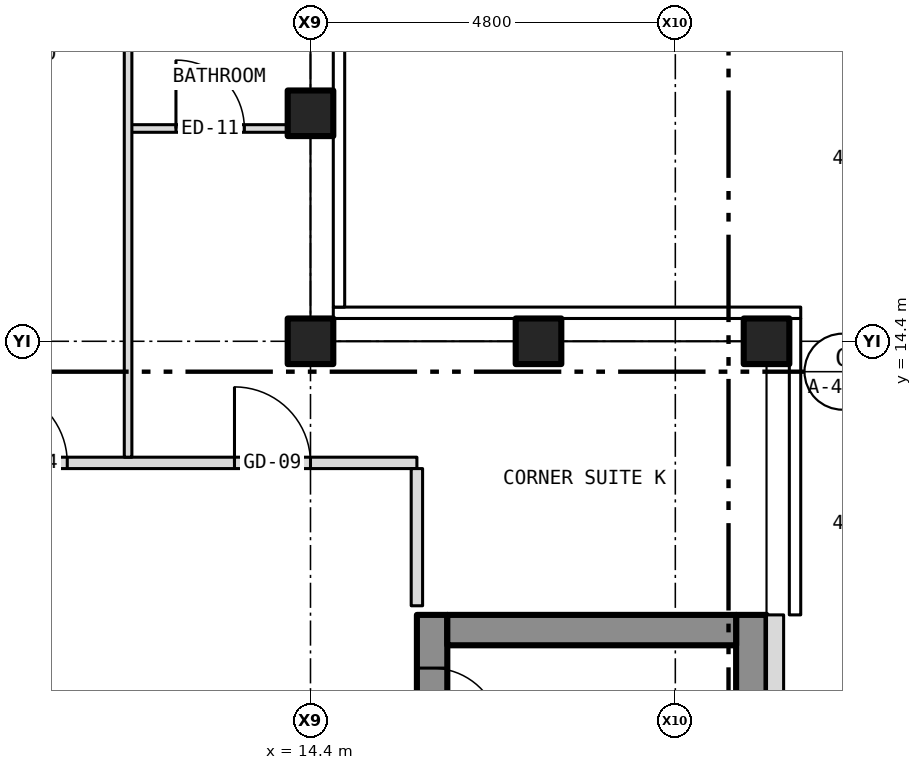
"""IFC4 building model, lengths in metres.
Left out: names, types, materials, properties, quantities, classifications, styles, units other than length and angle.
Written with IfcOpenShell. Run it as: python <this file> out.ifc"""

import sys

from ifc_helpers import new_model, si_unit, direction, frame, frame_2d, origin, origin_2d, place, context, subcontext, project, spatial, rectangle, hollow_rectangle, extrude, element, fill, save


model = new_model("IFC4")
c1 = context("Model", 3, precision=1e-05, world=origin(), true_north=direction((0.0, 1.0)))
c2 = subcontext(c1, "Body", "Model", "MODEL_VIEW")
j1 = project(units=[si_unit("LENGTHUNIT", "METRE"), si_unit("PLANEANGLEUNIT", "RADIAN")], contexts=[c1])
p1 = place(None, origin())
s1 = spatial("IfcSite", under=j1, at=p1, CompositionType="ELEMENT")
p2 = place(p1, origin())
s2 = spatial("IfcBuilding", under=s1, at=p2, CompositionType="ELEMENT")
p3 = place(p2, frame((0.0, 0.0, 262.0)))
s3 = spatial("IfcBuildingStorey", under=s2, at=p3, CompositionType="ELEMENT", Elevation=262.0)
for number, where, z_axis, x_axis in (
    (1, (20.4, 14.4, -0.15), (0.0, 0.0, 1.0), (1.0, 0.0, 0.0)),
    (2, (14.4, 14.4, -0.15), (0.0, 0.0, 1.0), (1.0, 0.0, 0.0)),
    (3, (14.4, 17.4, -0.15), (0.0, 0.0, 1.0), (1.0, 0.0, 0.0)),
    (4, (17.4, 14.4, -0.15), (0.0, 0.0, 1.0), (1.0, 0.0, 0.0)),
):
    element("IfcColumn", number, at=place(p3, frame(where, z_axis=z_axis, x_axis=x_axis)), inside=s3, PredefinedType="COLUMN", context=c2, shape_type="SweptSolid", body=[
        extrude(hollow_rectangle(XDim=0.6, YDim=0.6, WallThickness=0.03, at=origin_2d()), origin(), (0.0, 0.0, 1.0), 3.4),
    ])
p4 = place(p3, frame((16.0, -10.8, 0.0), z_axis=(0.0, 0.0, 1.0), x_axis=(0.0, 1.0, 0.0)))
e5 = element("IfcWall", 5, at=p4, inside=s3, PredefinedType="SHEAR", context=c2, shape_type="SweptSolid", body=[
    extrude(rectangle(XDim=21.6, YDim=0.4, at=frame_2d((10.8, 0.0))), origin(), (0.0, 0.0, 1.0), 3.25),
])
p5 = place(p4, frame((9.4, 0.0, 0.0)))
e6 = element("IfcOpeningElement", 6, at=p5, cuts=e5, PredefinedType="OPENING", context=c2, shape_type="SweptSolid", body=[
    extrude(rectangle(XDim=1.1, YDim=2.1, at=frame_2d((0.55, 1.05))), frame((0.0, 0.212, 0.0), z_axis=(0.0, -1.0, 0.0), x_axis=(1.0, 0.0, 0.0)), (0.0, 0.0, 1.0), 0.424),
])
p6 = place(p4, frame((11.5, 0.0, 0.0)))
e7 = element("IfcOpeningElement", 7, at=p6, cuts=e5, PredefinedType="OPENING", context=c2, shape_type="SweptSolid", body=[
    extrude(rectangle(XDim=1.1, YDim=2.1, at=frame_2d((0.55, 1.05))), frame((0.0, 0.212, 0.0), z_axis=(0.0, -1.0, 0.0), x_axis=(1.0, 0.0, 0.0)), (0.0, 0.0, 1.0), 0.424),
])
p7 = place(p4, frame((13.6, 0.0, 0.0)))
e8 = element("IfcOpeningElement", 8, at=p7, cuts=e5, PredefinedType="OPENING", context=c2, shape_type="SweptSolid", body=[
    extrude(rectangle(XDim=1.1, YDim=2.1, at=frame_2d((0.55, 1.05))), frame((0.0, 0.212, 0.0), z_axis=(0.0, -1.0, 0.0), x_axis=(1.0, 0.0, 0.0)), (0.0, 0.0, 1.0), 0.424),
])
p8 = place(p4, frame((15.7, 0.0, 0.0)))
e9 = element("IfcOpeningElement", 9, at=p8, cuts=e5, PredefinedType="OPENING", context=c2, shape_type="SweptSolid", body=[
    extrude(rectangle(XDim=1.1, YDim=2.1, at=frame_2d((0.55, 1.05))), frame((0.0, 0.212, 0.0), z_axis=(0.0, -1.0, 0.0), x_axis=(1.0, 0.0, 0.0)), (0.0, 0.0, 1.0), 0.424),
])
p9 = place(p4, frame((17.8, 0.0, 0.0)))
e10 = element("IfcOpeningElement", 10, at=p9, cuts=e5, PredefinedType="OPENING", context=c2, shape_type="SweptSolid", body=[
    extrude(rectangle(XDim=1.1, YDim=2.1, at=frame_2d((0.55, 1.05))), frame((0.0, 0.212, 0.0), z_axis=(0.0, -1.0, 0.0), x_axis=(1.0, 0.0, 0.0)), (0.0, 0.0, 1.0), 0.424),
])
p10 = place(p4, frame((5.642, 0.0, 0.0)))
e11 = element("IfcOpeningElement", 11, at=p10, cuts=e5, PredefinedType="OPENING", context=c2, shape_type="SweptSolid", body=[
    extrude(rectangle(XDim=1.1, YDim=2.1, at=frame_2d((0.55, 1.05))), frame((0.0, 0.212, 0.0), z_axis=(0.0, -1.0, 0.0), x_axis=(1.0, 0.0, 0.0)), (0.0, 0.0, 1.0), 0.424),
])
p11 = place(p4, frame((7.5, 0.0, 0.0)))
e12 = element("IfcOpeningElement", 12, at=p11, cuts=e5, PredefinedType="OPENING", context=c2, shape_type="SweptSolid", body=[
    extrude(rectangle(XDim=1.1, YDim=2.1, at=frame_2d((0.55, 1.05))), frame((0.0, 0.212, 0.0), z_axis=(0.0, -1.0, 0.0), x_axis=(1.0, 0.0, 0.0)), (0.0, 0.0, 1.0), 0.424),
])
p12 = place(p4, frame((20.0, 0.0, 0.0)))
e13 = element("IfcOpeningElement", 13, at=p12, cuts=e5, PredefinedType="OPENING", context=c2, shape_type="SweptSolid", body=[
    extrude(rectangle(XDim=0.9, YDim=2.1, at=frame_2d((0.45, 1.05))), frame((0.0, 0.212, 0.0), z_axis=(0.0, -1.0, 0.0), x_axis=(1.0, 0.0, 0.0)), (0.0, 0.0, 1.0), 0.424),
])
p13 = place(p3, frame((20.2, -10.8, 0.0), z_axis=(0.0, 0.0, 1.0), x_axis=(0.0, 1.0, 0.0)))
e14 = element("IfcWall", 14, at=p13, inside=s3, PredefinedType="SHEAR", context=c2, shape_type="SweptSolid", body=[
    extrude(rectangle(XDim=21.6, YDim=0.4, at=frame_2d((10.8, 0.0))), origin(), (0.0, 0.0, 1.0), 3.25),
])
p14 = place(p3, frame((16.2, 10.6, 0.0), z_axis=(0.0, 0.0, 1.0), x_axis=(1.0, 0.0, 0.0)))
e15 = element("IfcWall", 15, at=p14, inside=s3, PredefinedType="SHEAR", context=c2, shape_type="SweptSolid", body=[
    extrude(rectangle(XDim=3.8, YDim=0.4, at=frame_2d((1.9, 0.0))), origin(), (0.0, 0.0, 1.0), 3.25),
])
p15 = place(p3, frame((20.512, -10.8, 0.0), z_axis=(0.0, 0.0, 1.0), x_axis=(0.0, 1.0, 0.0)))
e16 = element("IfcWall", 16, at=p15, inside=s3, PredefinedType="SOLIDWALL", context=c2, shape_type="SweptSolid", body=[
    extrude(rectangle(XDim=21.6, YDim=0.225, at=frame_2d((10.8, 0.0))), origin(), (0.0, 0.0, 1.0), 3.5),
])
p16 = place(p15, frame((2.95, 0.0, 1.0)))
e17 = element("IfcOpeningElement", 17, at=p16, cuts=e16, PredefinedType="OPENING", context=c2, shape_type="SweptSolid", body=[
    extrude(rectangle(XDim=0.6, YDim=1.5, at=frame_2d((0.3, 0.75))), frame((0.0, 0.125, 0.0), z_axis=(0.0, -1.0, 0.0), x_axis=(1.0, 0.0, 0.0)), (0.0, 0.0, 1.0), 0.249),
])
p17 = place(p3, frame((-15.8, 12.8, 0.0), z_axis=(0.0, 0.0, 1.0), x_axis=(1.0, 0.0, 0.0)))
e18 = element("IfcWall", 18, at=p17, inside=s3, PredefinedType="PARTITIONING", context=c2, shape_type="SweptSolid", body=[
    extrude(rectangle(XDim=31.6, YDim=0.15, at=frame_2d((15.8, 0.0))), origin(), (0.0, 0.0, 1.0), 3.25),
])
p18 = place(p17, frame((4.6, 0.0, 0.0)))
e19 = element("IfcOpeningElement", 19, at=p18, cuts=e18, PredefinedType="OPENING", context=c2, shape_type="SweptSolid", body=[
    extrude(rectangle(XDim=1.0, YDim=2.1, at=frame_2d((0.5, 1.05))), frame((0.0, 0.087, 0.0), z_axis=(0.0, -1.0, 0.0), x_axis=(1.0, 0.0, 0.0)), (0.0, 0.0, 1.0), 0.174),
])
p19 = place(p17, frame((10.6, 0.0, 0.0)))
e20 = element("IfcOpeningElement", 20, at=p19, cuts=e18, PredefinedType="OPENING", context=c2, shape_type="SweptSolid", body=[
    extrude(rectangle(XDim=1.0, YDim=2.1, at=frame_2d((0.5, 1.05))), frame((0.0, 0.087, 0.0), z_axis=(0.0, -1.0, 0.0), x_axis=(1.0, 0.0, 0.0)), (0.0, 0.0, 1.0), 0.174),
])
p20 = place(p17, frame((17.8, 0.0, 0.0)))
e21 = element("IfcOpeningElement", 21, at=p20, cuts=e18, PredefinedType="OPENING", context=c2, shape_type="SweptSolid", body=[
    extrude(rectangle(XDim=1.0, YDim=2.1, at=frame_2d((0.5, 1.05))), frame((0.0, 0.087, 0.0), z_axis=(0.0, -1.0, 0.0), x_axis=(1.0, 0.0, 0.0)), (0.0, 0.0, 1.0), 0.174),
])
p21 = place(p17, frame((26.0, 0.0, 0.0)))
e22 = element("IfcOpeningElement", 22, at=p21, cuts=e18, PredefinedType="OPENING", context=c2, shape_type="SweptSolid", body=[
    extrude(rectangle(XDim=1.0, YDim=2.1, at=frame_2d((0.5, 1.05))), frame((0.0, 0.087, 0.0), z_axis=(0.0, -1.0, 0.0), x_axis=(1.0, 0.0, 0.0)), (0.0, 0.0, 1.0), 0.174),
])
p22 = place(p17, frame((1.4, 0.0, 0.0)))
e23 = element("IfcOpeningElement", 23, at=p22, cuts=e18, PredefinedType="OPENING", context=c2, shape_type="SweptSolid", body=[
    extrude(rectangle(XDim=1.0, YDim=2.1, at=frame_2d((0.5, 1.05))), frame((0.0, 0.087, 0.0), z_axis=(0.0, -1.0, 0.0), x_axis=(1.0, 0.0, 0.0)), (0.0, 0.0, 1.0), 0.174),
])
p23 = place(p17, frame((29.2, 0.0, 0.0)))
e24 = element("IfcOpeningElement", 24, at=p23, cuts=e18, PredefinedType="OPENING", context=c2, shape_type="SweptSolid", body=[
    extrude(rectangle(XDim=1.0, YDim=2.1, at=frame_2d((0.5, 1.05))), frame((0.0, 0.087, 0.0), z_axis=(0.0, -1.0, 0.0), x_axis=(1.0, 0.0, 0.0)), (0.0, 0.0, 1.0), 0.174),
])
p24 = place(p3, frame((12.0, 17.2, 0.0), z_axis=(0.0, 0.0, 1.0), x_axis=(1.0, 0.0, 0.0)))
e25 = element("IfcWall", 25, at=p24, inside=s3, PredefinedType="PARTITIONING", context=c2, shape_type="SweptSolid", body=[
    extrude(rectangle(XDim=2.28, YDim=0.1, at=frame_2d((1.14, 0.0))), origin(), (0.0, 0.0, 1.0), 3.25),
])
p25 = place(p24, frame((0.63, 0.0, 0.0)))
e26 = element("IfcOpeningElement", 26, at=p25, cuts=e25, PredefinedType="OPENING", context=c2, shape_type="SweptSolid", body=[
    extrude(rectangle(XDim=0.9, YDim=2.1, at=frame_2d((0.45, 1.05))), frame((0.0, 0.062, 0.0), z_axis=(0.0, -1.0, 0.0), x_axis=(1.0, 0.0, 0.0)), (0.0, 0.0, 1.0), 0.124),
])
p26 = place(p3, frame((12.0, 12.875, 0.0), z_axis=(0.0, 0.0, 1.0), x_axis=(0.0, 1.0, 0.0)))
e27 = element("IfcWall", 27, at=p26, inside=s3, PredefinedType="PARTITIONING", context=c2, shape_type="SweptSolid", body=[
    extrude(rectangle(XDim=7.855, YDim=0.1, at=frame_2d((3.927, 0.0))), origin(), (0.0, 0.0, 1.0), 3.25),
])
p27 = place(p3, frame((15.8, 10.92, 0.0), z_axis=(0.0, 0.0, 1.0), x_axis=(0.0, 1.0, 0.0)))
e28 = element("IfcWall", 28, at=p27, inside=s3, PredefinedType="PARTITIONING", context=c2, shape_type="SweptSolid", body=[
    extrude(rectangle(XDim=1.805, YDim=0.15, at=frame_2d((0.903, 0.0))), origin(), (0.0, 0.0, 1.0), 3.25),
])
p28 = place(p12, origin())
e29 = element("IfcDoor", 29, at=p28, inside=s3, OperationType="SINGLE_SWING_LEFT", PredefinedType="DOOR", context=c2, shape_type="SweptSolid", body=[
    extrude(rectangle(XDim=0.9, YDim=2.1, at=frame_2d((0.45, 1.05))), frame((0.0, 0.025, 0.0), z_axis=(0.0, -1.0, 0.0), x_axis=(1.0, 0.0, 0.0)), (0.0, 0.0, 1.0), 0.05),
])
fill(e13, e29)
p29 = place(p21, origin())
e30 = element("IfcDoor", 30, at=p29, inside=s3, OperationType="SINGLE_SWING_LEFT", PredefinedType="DOOR", context=c2, shape_type="SweptSolid", body=[
    extrude(rectangle(XDim=1.0, YDim=2.1, at=frame_2d((0.5, 1.05))), frame((0.0, 0.025, 0.0), z_axis=(0.0, -1.0, 0.0), x_axis=(1.0, 0.0, 0.0)), (0.0, 0.0, 1.0), 0.05),
])
fill(e22, e30)
p30 = place(p25, origin())
e31 = element("IfcDoor", 31, at=p30, inside=s3, OperationType="SINGLE_SWING_LEFT", PredefinedType="DOOR", context=c2, shape_type="SweptSolid", body=[
    extrude(rectangle(XDim=0.9, YDim=2.1, at=frame_2d((0.45, 1.05))), frame((0.0, 0.025, 0.0), z_axis=(0.0, -1.0, 0.0), x_axis=(1.0, 0.0, 0.0)), (0.0, 0.0, 1.0), 0.05),
])
fill(e26, e31)
p31 = place(p23, origin())
e32 = element("IfcDoor", 32, at=p31, inside=s3, OperationType="SINGLE_SWING_LEFT", PredefinedType="DOOR", context=c2, shape_type="SweptSolid", body=[
    extrude(rectangle(XDim=1.0, YDim=2.1, at=frame_2d((0.5, 1.05))), frame((0.0, 0.025, 0.0), z_axis=(0.0, -1.0, 0.0), x_axis=(1.0, 0.0, 0.0)), (0.0, 0.0, 1.0), 0.05),
])
fill(e24, e32)
save(model, sys.argv[1])
